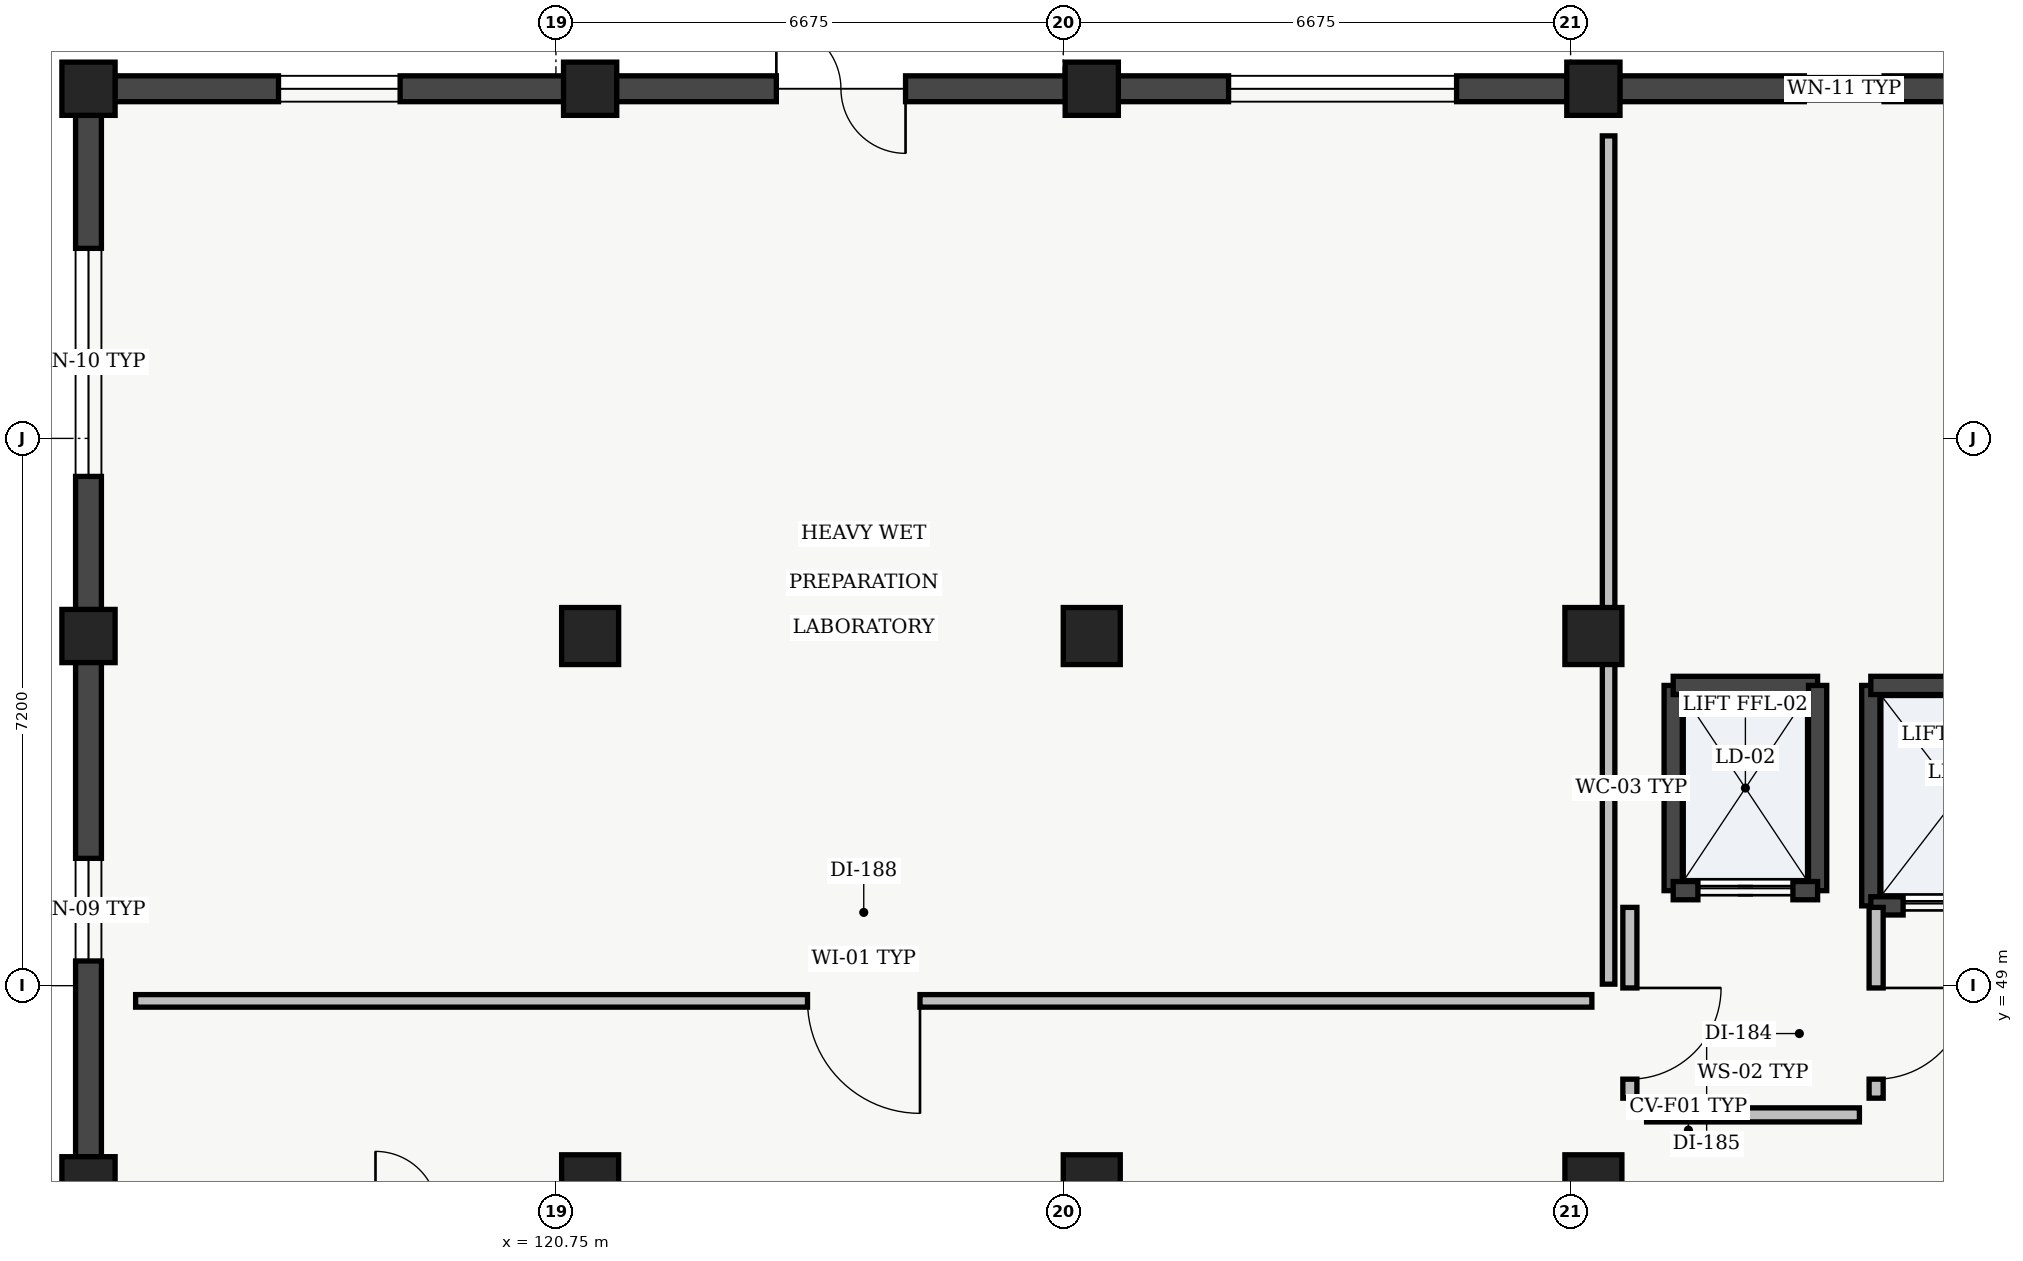
"""IFC4 building model, lengths in metres.
Left out: names, types, materials, properties, quantities, classifications, styles, units other than length and angle.
Written with IfcOpenShell. Run it as: python <this file> out.ifc"""

import sys

from ifc_helpers import new_model, si_unit, direction, frame, frame_2d, origin, origin_2d, place, context, subcontext, project, spatial, rectangle, extrude, element, fill, save


model = new_model("IFC4")
c1 = context("Model", 3, precision=1e-05, world=origin(), true_north=direction((0.0, 1.0)))
c2 = subcontext(c1, "Body", "Model", "MODEL_VIEW")
j1 = project(units=[si_unit("LENGTHUNIT", "METRE"), si_unit("PLANEANGLEUNIT", "RADIAN")], contexts=[c1])
p1 = place(None, origin())
s1 = spatial("IfcSite", under=j1, at=p1, CompositionType="ELEMENT")
p2 = place(p1, origin())
s2 = spatial("IfcBuilding", under=s1, at=p2, CompositionType="ELEMENT")
p3 = place(p2, origin())
s3 = spatial("IfcBuildingStorey", under=s2, at=p3, CompositionType="ELEMENT", Elevation=0.0)
for number, where, z_axis, x_axis in (
    (1, (114.6, 46.4, 0.0), (0.0, 0.0, 1.0), (1.0, 0.0, 0.0)),
    (2, (114.6, 53.6, 0.0), (0.0, 0.0, 1.0), (1.0, 0.0, 0.0)),
    (3, (114.6, 60.8, 0.0), (0.0, 0.0, 1.0), (1.0, 0.0, 0.0)),
):
    element("IfcColumn", number, at=place(p3, frame(where, z_axis=z_axis, x_axis=x_axis)), inside=s3, PredefinedType="COLUMN", context=c2, shape_type="SweptSolid", body=[
        extrude(rectangle(XDim=0.7, YDim=0.7, at=origin_2d()), origin(), (0.0, 0.0, 1.0), 4.9),
    ])
for number, where, z_axis, x_axis in (
    (4, (121.2, 46.4, 0.0), (0.0, 0.0, 1.0), (1.0, 0.0, 0.0)),
    (5, (121.2, 53.6, 0.0), (0.0, 0.0, 1.0), (1.0, 0.0, 0.0)),
):
    element("IfcColumn", number, at=place(p3, frame(where, z_axis=z_axis, x_axis=x_axis)), inside=s3, PredefinedType="COLUMN", context=c2, shape_type="SweptSolid", body=[
        extrude(rectangle(XDim=0.75, YDim=0.75, at=origin_2d()), origin(), (0.0, 0.0, 1.0), 4.9),
    ])
p4 = place(p3, frame((121.2, 60.8, 0.0), z_axis=(0.0, 0.0, 1.0), x_axis=(1.0, 0.0, 0.0)))
e6 = element("IfcColumn", 6, at=p4, inside=s3, PredefinedType="COLUMN", context=c2, shape_type="SweptSolid", body=[
    extrude(rectangle(XDim=0.7, YDim=0.7, at=origin_2d()), origin(), (0.0, 0.0, 1.0), 4.9),
])
for number, where, z_axis, x_axis in (
    (7, (127.8, 46.4, 0.0), (0.0, 0.0, 1.0), (1.0, 0.0, 0.0)),
    (8, (127.8, 53.6, 0.0), (0.0, 0.0, 1.0), (1.0, 0.0, 0.0)),
):
    element("IfcColumn", number, at=place(p3, frame(where, z_axis=z_axis, x_axis=x_axis)), inside=s3, PredefinedType="COLUMN", context=c2, shape_type="SweptSolid", body=[
        extrude(rectangle(XDim=0.75, YDim=0.75, at=origin_2d()), origin(), (0.0, 0.0, 1.0), 4.9),
    ])
p5 = place(p3, frame((127.8, 60.8, 0.0), z_axis=(0.0, 0.0, 1.0), x_axis=(1.0, 0.0, 0.0)))
e9 = element("IfcColumn", 9, at=p5, inside=s3, PredefinedType="COLUMN", context=c2, shape_type="SweptSolid", body=[
    extrude(rectangle(XDim=0.7, YDim=0.7, at=origin_2d()), origin(), (0.0, 0.0, 1.0), 4.9),
])
for number, where, z_axis, x_axis in (
    (10, (134.4, 46.4, 0.0), (0.0, 0.0, 1.0), (1.0, 0.0, 0.0)),
    (11, (134.4, 53.6, 0.0), (0.0, 0.0, 1.0), (1.0, 0.0, 0.0)),
):
    element("IfcColumn", number, at=place(p3, frame(where, z_axis=z_axis, x_axis=x_axis)), inside=s3, PredefinedType="COLUMN", context=c2, shape_type="SweptSolid", body=[
        extrude(rectangle(XDim=0.75, YDim=0.75, at=origin_2d()), origin(), (0.0, 0.0, 1.0), 4.9),
    ])
p6 = place(p3, frame((134.4, 60.8, 0.0), z_axis=(0.0, 0.0, 1.0), x_axis=(1.0, 0.0, 0.0)))
e12 = element("IfcColumn", 12, at=p6, inside=s3, PredefinedType="COLUMN", context=c2, shape_type="SweptSolid", body=[
    extrude(rectangle(XDim=0.7, YDim=0.7, at=origin_2d()), origin(), (0.0, 0.0, 1.0), 4.9),
])
p7 = place(p3, frame((114.6, 46.745, 0.0), z_axis=(0.0, 0.0, 1.0), x_axis=(0.0, 1.0, 0.0)))
e13 = element("IfcWall", 13, at=p7, inside=s3, PredefinedType="SOLIDWALL", context=c2, shape_type="SweptSolid", body=[
    extrude(rectangle(XDim=6.51, YDim=0.34, at=frame_2d((3.255, 0.0))), origin(), (0.0, 0.0, 1.0), 4.435),
])
p8 = place(p7, frame((2.58, 0.0, 0.95)))
e14 = element("IfcOpeningElement", 14, at=p8, cuts=e13, PredefinedType="OPENING", context=c2, shape_type="SweptSolid", body=[
    extrude(rectangle(XDim=1.35, YDim=1.8, at=frame_2d((0.675, 0.9))), frame((0.0, 0.17, 0.0), z_axis=(0.0, -1.0, 0.0), x_axis=(1.0, 0.0, 0.0)), (0.0, 0.0, 1.0), 0.34),
])
p9 = place(p3, frame((114.6, 53.945, 0.0), z_axis=(0.0, 0.0, 1.0), x_axis=(0.0, 1.0, 0.0)))
e15 = element("IfcWall", 15, at=p9, inside=s3, PredefinedType="SOLIDWALL", context=c2, shape_type="SweptSolid", body=[
    extrude(rectangle(XDim=6.51, YDim=0.34, at=frame_2d((3.255, 0.0))), origin(), (0.0, 0.0, 1.0), 4.435),
])
p10 = place(p9, frame((1.755, 0.0, 0.95)))
e16 = element("IfcOpeningElement", 16, at=p10, cuts=e15, PredefinedType="OPENING", context=c2, shape_type="SweptSolid", body=[
    extrude(rectangle(XDim=3.0, YDim=1.65, at=frame_2d((1.5, 0.825))), frame((0.0, 0.17, 0.0), z_axis=(0.0, -1.0, 0.0), x_axis=(1.0, 0.0, 0.0)), (0.0, 0.0, 1.0), 0.34),
])
p11 = place(p3, frame((114.945, 60.8, 0.0), z_axis=(0.0, 0.0, 1.0), x_axis=(1.0, 0.0, 0.0)))
e17 = element("IfcWall", 17, at=p11, inside=s3, PredefinedType="SOLIDWALL", context=c2, shape_type="SweptSolid", body=[
    extrude(rectangle(XDim=5.91, YDim=0.34, at=frame_2d((2.955, 0.0))), origin(), (0.0, 0.0, 1.0), 4.435),
])
p12 = place(p11, frame((2.155, 0.0, 0.95)))
e18 = element("IfcOpeningElement", 18, at=p12, cuts=e17, PredefinedType="OPENING", context=c2, shape_type="SweptSolid", body=[
    extrude(rectangle(XDim=1.6, YDim=1.4, at=frame_2d((0.8, 0.7))), frame((0.0, 0.17, 0.0), z_axis=(0.0, -1.0, 0.0), x_axis=(1.0, 0.0, 0.0)), (0.0, 0.0, 1.0), 0.34),
])
p13 = place(p3, frame((121.545, 60.8, 0.0), z_axis=(0.0, 0.0, 1.0), x_axis=(1.0, 0.0, 0.0)))
e19 = element("IfcWall", 19, at=p13, inside=s3, PredefinedType="SOLIDWALL", context=c2, shape_type="SweptSolid", body=[
    extrude(rectangle(XDim=5.91, YDim=0.34, at=frame_2d((2.955, 0.0))), origin(), (0.0, 0.0, 1.0), 4.435),
])
p14 = place(p13, frame((2.105, 0.0, 0.0)))
e20 = element("IfcOpeningElement", 20, at=p14, cuts=e19, PredefinedType="OPENING", context=c2, shape_type="SweptSolid", body=[
    extrude(rectangle(XDim=1.7, YDim=2.2, at=frame_2d((0.85, 1.1))), frame((0.0, 0.17, 0.0), z_axis=(0.0, -1.0, 0.0), x_axis=(1.0, 0.0, 0.0)), (0.0, 0.0, 1.0), 0.34),
])
p15 = place(p3, frame((128.145, 60.8, 0.0), z_axis=(0.0, 0.0, 1.0), x_axis=(1.0, 0.0, 0.0)))
e21 = element("IfcWall", 21, at=p15, inside=s3, PredefinedType="SOLIDWALL", context=c2, shape_type="SweptSolid", body=[
    extrude(rectangle(XDim=5.91, YDim=0.34, at=frame_2d((2.955, 0.0))), origin(), (0.0, 0.0, 1.0), 4.435),
])
p16 = place(p15, frame((1.455, 0.0, 0.95)))
e22 = element("IfcOpeningElement", 22, at=p16, cuts=e21, PredefinedType="OPENING", context=c2, shape_type="SweptSolid", body=[
    extrude(rectangle(XDim=3.0, YDim=1.65, at=frame_2d((1.5, 0.825))), frame((0.0, 0.17, 0.0), z_axis=(0.0, -1.0, 0.0), x_axis=(1.0, 0.0, 0.0)), (0.0, 0.0, 1.0), 0.34),
])
p17 = place(p3, frame((134.745, 60.8, 0.0), z_axis=(0.0, 0.0, 1.0), x_axis=(1.0, 0.0, 0.0)))
e23 = element("IfcWall", 23, at=p17, inside=s3, PredefinedType="SOLIDWALL", context=c2, shape_type="SweptSolid", body=[
    extrude(rectangle(XDim=5.91, YDim=0.34, at=frame_2d((2.955, 0.0))), origin(), (0.0, 0.0, 1.0), 4.435),
])
p18 = place(p17, frame((2.43, 0.0, 0.95)))
e24 = element("IfcOpeningElement", 24, at=p18, cuts=e23, PredefinedType="OPENING", context=c2, shape_type="SweptSolid", body=[
    extrude(rectangle(XDim=1.05, YDim=1.2, at=frame_2d((0.525, 0.6))), frame((0.0, 0.17, 0.0), z_axis=(0.0, -1.0, 0.0), x_axis=(1.0, 0.0, 0.0)), (0.0, 0.0, 1.0), 0.34),
])
p19 = place(p3, frame((135.45, 50.25, 0.0), z_axis=(0.0, 0.0, 1.0), x_axis=(0.0, 1.0, 0.0)))
e25 = element("IfcWall", 25, at=p19, inside=s3, PredefinedType="SHEAR", context=c2, shape_type="SweptSolid", body=[
    extrude(rectangle(XDim=2.7, YDim=0.24, at=frame_2d((1.35, 0.0))), origin(), (0.0, 0.0, 1.0), 4.88),
])
p20 = place(p3, frame((135.45, 52.95, 0.0), z_axis=(0.0, 0.0, 1.0), x_axis=(1.0, 0.0, 0.0)))
e26 = element("IfcWall", 26, at=p20, inside=s3, PredefinedType="SHEAR", context=c2, shape_type="SweptSolid", body=[
    extrude(rectangle(XDim=1.9, YDim=0.24, at=frame_2d((0.95, 0.0))), origin(), (0.0, 0.0, 1.0), 4.88),
])
p21 = place(p3, frame((137.35, 52.95, 0.0), z_axis=(0.0, 0.0, 1.0), x_axis=(0.0, -1.0, 0.0)))
e27 = element("IfcWall", 27, at=p21, inside=s3, PredefinedType="SHEAR", context=c2, shape_type="SweptSolid", body=[
    extrude(rectangle(XDim=2.7, YDim=0.24, at=frame_2d((1.35, 0.0))), origin(), (0.0, 0.0, 1.0), 4.88),
])
p22 = place(p3, frame((137.35, 50.25, 0.0), z_axis=(0.0, 0.0, 1.0), x_axis=(-1.0, 0.0, 0.0)))
e28 = element("IfcWall", 28, at=p22, inside=s3, PredefinedType="SHEAR", context=c2, shape_type="SweptSolid", body=[
    extrude(rectangle(XDim=1.9, YDim=0.24, at=frame_2d((0.95, 0.0))), origin(), (0.0, 0.0, 1.0), 4.88),
])
p23 = place(p22, frame((0.325, 0.0, 0.0)))
e29 = element("IfcOpeningElement", 29, at=p23, cuts=e28, PredefinedType="OPENING", context=c2, shape_type="SweptSolid", body=[
    extrude(rectangle(XDim=1.25, YDim=2.2, at=frame_2d((0.625, 1.1))), frame((0.0, 0.12, 0.0), z_axis=(0.0, -1.0, 0.0), x_axis=(1.0, 0.0, 0.0)), (0.0, 0.0, 1.0), 0.24),
])
p24 = place(p3, frame((138.05, 50.05, 0.0), z_axis=(0.0, 0.0, 1.0), x_axis=(0.0, 1.0, 0.0)))
e30 = element("IfcWall", 30, at=p24, inside=s3, PredefinedType="SHEAR", context=c2, shape_type="SweptSolid", body=[
    extrude(rectangle(XDim=2.9, YDim=0.24, at=frame_2d((1.45, 0.0))), origin(), (0.0, 0.0, 1.0), 4.88),
])
p25 = place(p3, frame((138.05, 52.95, 0.0), z_axis=(0.0, 0.0, 1.0), x_axis=(1.0, 0.0, 0.0)))
e31 = element("IfcWall", 31, at=p25, inside=s3, PredefinedType="SHEAR", context=c2, shape_type="SweptSolid", body=[
    extrude(rectangle(XDim=2.3, YDim=0.24, at=frame_2d((1.15, 0.0))), origin(), (0.0, 0.0, 1.0), 4.88),
])
p26 = place(p3, frame((140.35, 50.05, 0.0), z_axis=(0.0, 0.0, 1.0), x_axis=(-1.0, 0.0, 0.0)))
e32 = element("IfcWall", 32, at=p26, inside=s3, PredefinedType="SHEAR", context=c2, shape_type="SweptSolid", body=[
    extrude(rectangle(XDim=2.3, YDim=0.24, at=frame_2d((1.15, 0.0))), origin(), (0.0, 0.0, 1.0), 4.88),
])
p27 = place(p26, frame((0.425, 0.0, 0.0)))
e33 = element("IfcOpeningElement", 33, at=p27, cuts=e32, PredefinedType="OPENING", context=c2, shape_type="SweptSolid", body=[
    extrude(rectangle(XDim=1.45, YDim=2.3, at=frame_2d((0.725, 1.15))), frame((0.0, 0.12, 0.0), z_axis=(0.0, -1.0, 0.0), x_axis=(1.0, 0.0, 0.0)), (0.0, 0.0, 1.0), 0.24),
])
p28 = place(p3, frame((135.1, 47.3, 0.0), z_axis=(0.0, 0.0, 1.0), x_axis=(1.0, 0.0, 0.0)))
e34 = element("IfcWall", 34, at=p28, inside=s3, PredefinedType="SOLIDWALL", context=c2, shape_type="SweptSolid", body=[
    extrude(rectangle(XDim=2.8, YDim=0.185, at=frame_2d((1.4, 0.0))), origin(), (0.0, 0.0, 1.0), 4.55),
])
p29 = place(p3, frame((138.12, 47.52, 0.0), z_axis=(0.0, 0.0, 1.0), x_axis=(0.0, 1.0, 0.0)))
e35 = element("IfcWall", 35, at=p29, inside=s3, PredefinedType="SOLIDWALL", context=c2, shape_type="SweptSolid", body=[
    extrude(rectangle(XDim=2.51, YDim=0.185, at=frame_2d((1.255, 0.0))), origin(), (0.0, 0.0, 1.0), 4.55),
])
p30 = place(p29, frame((0.25, 0.0, 0.0)))
e36 = element("IfcOpeningElement", 36, at=p30, cuts=e35, PredefinedType="OPENING", context=c2, shape_type="SweptSolid", body=[
    extrude(rectangle(XDim=1.2, YDim=2.15, at=frame_2d((0.6, 1.075))), frame((0.0, 0.093, 0.0), z_axis=(0.0, -1.0, 0.0), x_axis=(1.0, 0.0, 0.0)), (0.0, 0.0, 1.0), 0.185),
])
p31 = place(p3, frame((134.88, 50.03, 0.0), z_axis=(0.0, 0.0, 1.0), x_axis=(0.0, -1.0, 0.0)))
e37 = element("IfcWall", 37, at=p31, inside=s3, PredefinedType="SOLIDWALL", context=c2, shape_type="SweptSolid", body=[
    extrude(rectangle(XDim=2.51, YDim=0.185, at=frame_2d((1.255, 0.0))), origin(), (0.0, 0.0, 1.0), 4.55),
])
p32 = place(p31, frame((1.06, 0.0, 0.0)))
e38 = element("IfcOpeningElement", 38, at=p32, cuts=e37, PredefinedType="OPENING", context=c2, shape_type="SweptSolid", body=[
    extrude(rectangle(XDim=1.2, YDim=2.15, at=frame_2d((0.6, 1.075))), frame((0.0, 0.093, 0.0), z_axis=(0.0, -1.0, 0.0), x_axis=(1.0, 0.0, 0.0)), (0.0, 0.0, 1.0), 0.185),
])
p33 = place(p3, frame((115.22, 48.8, 0.0), z_axis=(0.0, 0.0, 1.0), x_axis=(1.0, 0.0, 0.0)))
e39 = element("IfcWall", 39, at=p33, inside=s3, PredefinedType="PARTITIONING", context=c2, shape_type="SweptSolid", body=[
    extrude(rectangle(XDim=19.16, YDim=0.165, at=frame_2d((9.58, 0.0))), origin(), (0.0, 0.0, 1.0), 4.485),
])
p34 = place(p33, frame((8.84, 0.0, 0.0)))
e40 = element("IfcOpeningElement", 40, at=p34, cuts=e39, PredefinedType="OPENING", context=c2, shape_type="SweptSolid", body=[
    extrude(rectangle(XDim=1.48, YDim=2.1, at=frame_2d((0.74, 1.05))), frame((0.0, 0.083, 0.0), z_axis=(0.0, -1.0, 0.0), x_axis=(1.0, 0.0, 0.0)), (0.0, 0.0, 1.0), 0.165),
])
p35 = place(p3, frame((134.6, 49.02, 0.0), z_axis=(0.0, 0.0, 1.0), x_axis=(0.0, 1.0, 0.0)))
e41 = element("IfcWall", 41, at=p35, inside=s3, PredefinedType="PARTITIONING", context=c2, shape_type="SweptSolid", body=[
    extrude(rectangle(XDim=11.16, YDim=0.165, at=frame_2d((5.58, 0.0))), origin(), (0.0, 0.0, 1.0), 4.235),
])
p36 = place(p8, origin())
e42 = element("IfcWindow", 42, at=p36, inside=s3, PartitioningType="SINGLE_PANEL", PredefinedType="WINDOW", context=c2, shape_type="SweptSolid", body=[
    extrude(rectangle(XDim=1.35, YDim=1.8, at=frame_2d((0.675, 0.9))), frame((0.0, 0.03, 0.0), z_axis=(0.0, -1.0, 0.0), x_axis=(1.0, 0.0, 0.0)), (0.0, 0.0, 1.0), 0.06),
])
fill(e14, e42)
p37 = place(p10, origin())
e43 = element("IfcWindow", 43, at=p37, inside=s3, PartitioningType="SINGLE_PANEL", PredefinedType="WINDOW", context=c2, shape_type="SweptSolid", body=[
    extrude(rectangle(XDim=3.0, YDim=1.65, at=frame_2d((1.5, 0.825))), frame((0.0, 0.03, 0.0), z_axis=(0.0, -1.0, 0.0), x_axis=(1.0, 0.0, 0.0)), (0.0, 0.0, 1.0), 0.06),
])
fill(e16, e43)
p38 = place(p12, origin())
e44 = element("IfcWindow", 44, at=p38, inside=s3, PartitioningType="SINGLE_PANEL", PredefinedType="WINDOW", context=c2, shape_type="SweptSolid", body=[
    extrude(rectangle(XDim=1.6, YDim=1.4, at=frame_2d((0.8, 0.7))), frame((0.0, 0.03, 0.0), z_axis=(0.0, -1.0, 0.0), x_axis=(1.0, 0.0, 0.0)), (0.0, 0.0, 1.0), 0.06),
])
fill(e18, e44)
p39 = place(p14, origin())
e45 = element("IfcDoor", 45, at=p39, inside=s3, OperationType="DOUBLE_DOOR_SINGLE_SWING", PredefinedType="DOOR", context=c2, shape_type="SweptSolid", body=[
    extrude(rectangle(XDim=1.7, YDim=2.2, at=frame_2d((0.85, 1.1))), frame((0.0, 0.025, 0.0), z_axis=(0.0, -1.0, 0.0), x_axis=(1.0, 0.0, 0.0)), (0.0, 0.0, 1.0), 0.05),
])
fill(e20, e45)
p40 = place(p16, origin())
e46 = element("IfcWindow", 46, at=p40, inside=s3, PartitioningType="SINGLE_PANEL", PredefinedType="WINDOW", context=c2, shape_type="SweptSolid", body=[
    extrude(rectangle(XDim=3.0, YDim=1.65, at=frame_2d((1.5, 0.825))), frame((0.0, 0.03, 0.0), z_axis=(0.0, -1.0, 0.0), x_axis=(1.0, 0.0, 0.0)), (0.0, 0.0, 1.0), 0.06),
])
fill(e22, e46)
p41 = place(p18, origin())
e47 = element("IfcWindow", 47, at=p41, inside=s3, PartitioningType="SINGLE_PANEL", PredefinedType="WINDOW", context=c2, shape_type="SweptSolid", body=[
    extrude(rectangle(XDim=1.05, YDim=1.2, at=frame_2d((0.525, 0.6))), frame((0.0, 0.03, 0.0), z_axis=(0.0, -1.0, 0.0), x_axis=(1.0, 0.0, 0.0)), (0.0, 0.0, 1.0), 0.06),
])
fill(e24, e47)
p42 = place(p23, origin())
e48 = element("IfcDoor", 48, at=p42, inside=s3, OperationType="SLIDING_TO_RIGHT", PredefinedType="DOOR", context=c2, shape_type="SweptSolid", body=[
    extrude(rectangle(XDim=1.25, YDim=2.2, at=frame_2d((0.625, 1.1))), frame((0.0, 0.025, 0.0), z_axis=(0.0, -1.0, 0.0), x_axis=(1.0, 0.0, 0.0)), (0.0, 0.0, 1.0), 0.05),
])
fill(e29, e48)
p43 = place(p27, origin())
e49 = element("IfcDoor", 49, at=p43, inside=s3, OperationType="DOUBLE_DOOR_SLIDING", PredefinedType="DOOR", context=c2, shape_type="SweptSolid", body=[
    extrude(rectangle(XDim=1.45, YDim=2.3, at=frame_2d((0.725, 1.15))), frame((0.0, 0.025, 0.0), z_axis=(0.0, -1.0, 0.0), x_axis=(1.0, 0.0, 0.0)), (0.0, 0.0, 1.0), 0.05),
])
fill(e33, e49)
p44 = place(p30, origin())
e50 = element("IfcDoor", 50, at=p44, inside=s3, OperationType="SINGLE_SWING_RIGHT", PredefinedType="DOOR", context=c2, shape_type="SweptSolid", body=[
    extrude(rectangle(XDim=1.2, YDim=2.15, at=frame_2d((0.6, 1.075))), frame((0.0, 0.025, 0.0), z_axis=(0.0, -1.0, 0.0), x_axis=(1.0, 0.0, 0.0)), (0.0, 0.0, 1.0), 0.05),
])
fill(e36, e50)
p45 = place(p32, origin())
e51 = element("IfcDoor", 51, at=p45, inside=s3, OperationType="SINGLE_SWING_LEFT", PredefinedType="DOOR", context=c2, shape_type="SweptSolid", body=[
    extrude(rectangle(XDim=1.2, YDim=2.15, at=frame_2d((0.6, 1.075))), frame((0.0, 0.025, 0.0), z_axis=(0.0, -1.0, 0.0), x_axis=(1.0, 0.0, 0.0)), (0.0, 0.0, 1.0), 0.05),
])
fill(e38, e51)
p46 = place(p34, origin())
e52 = element("IfcDoor", 52, at=p46, inside=s3, OperationType="SINGLE_SWING_RIGHT", PredefinedType="DOOR", context=c2, shape_type="SweptSolid", body=[
    extrude(rectangle(XDim=1.48, YDim=2.1, at=frame_2d((0.74, 1.05))), frame((0.0, 0.025, 0.0), z_axis=(0.0, -1.0, 0.0), x_axis=(1.0, 0.0, 0.0)), (0.0, 0.0, 1.0), 0.05),
])
fill(e40, e52)
save(model, sys.argv[1])
